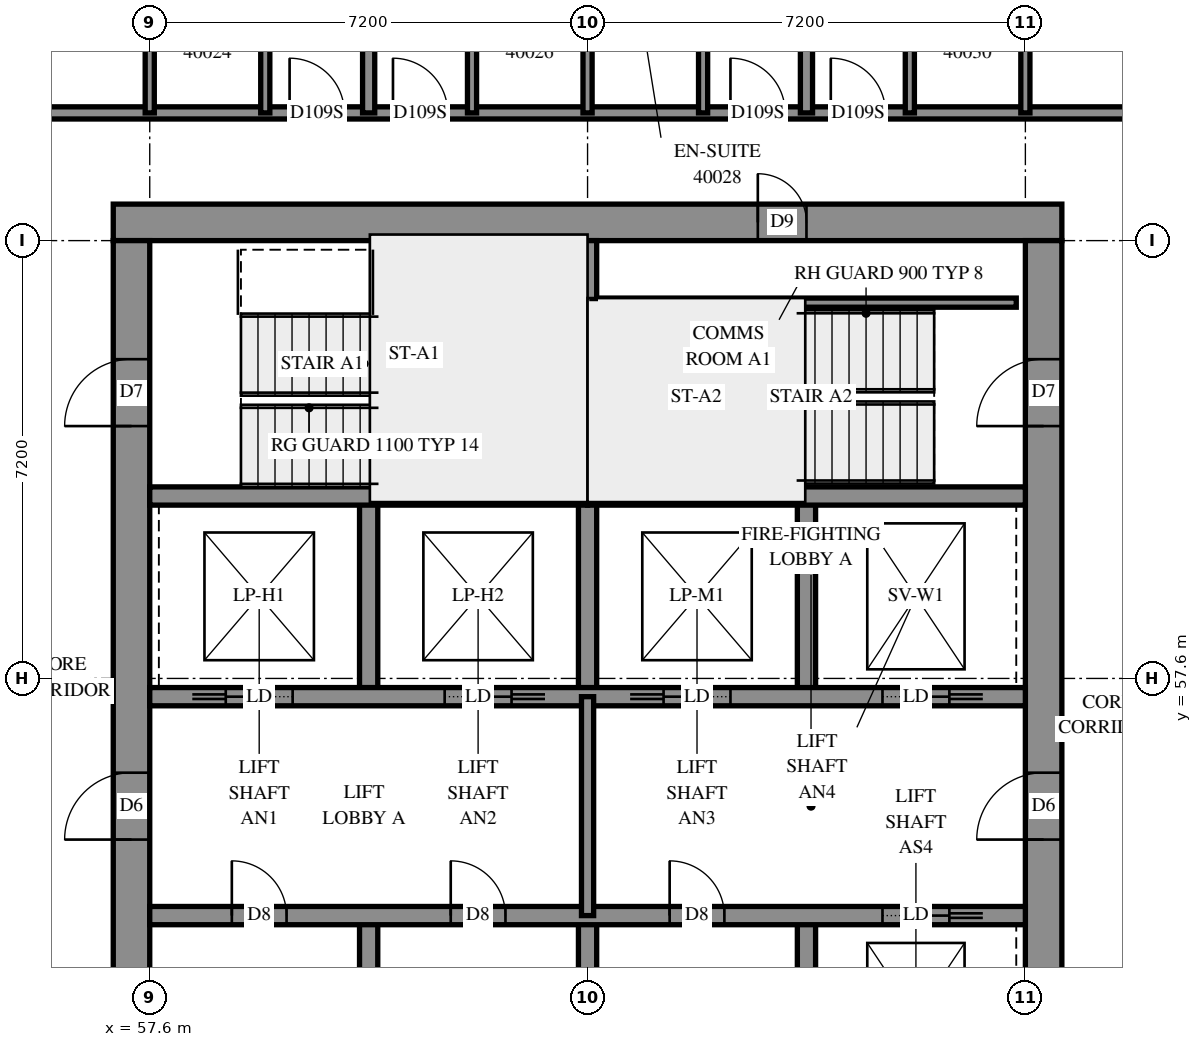
"""IFC4 building model, lengths in metres.
Left out: names, types, materials, properties, quantities, classifications, styles, units other than length and angle.
Written with IfcOpenShell. Run it as: python <this file> out.ifc"""

import sys

from ifc_helpers import new_model, si_unit, direction, frame, frame_2d, origin, place, context, subcontext, project, spatial, rectangle, extrude, element, fill, save


model = new_model("IFC4")
c1 = context("Model", 3, precision=1e-05, world=origin(), true_north=direction((0.0, 1.0)))
c2 = subcontext(c1, "Body", "Model", "MODEL_VIEW")
j1 = project(units=[si_unit("LENGTHUNIT", "METRE"), si_unit("PLANEANGLEUNIT", "RADIAN")], contexts=[c1])
p1 = place(None, origin())
s1 = spatial("IfcSite", under=j1, at=p1, CompositionType="ELEMENT")
p2 = place(p1, origin())
s2 = spatial("IfcBuilding", under=s1, at=p2, CompositionType="ELEMENT")
p3 = place(p2, frame((0.0, 0.0, 149.0)))
s3 = spatial("IfcBuildingStorey", under=s2, at=p3, CompositionType="ELEMENT", Elevation=149.0)
p4 = place(p3, frame((57.0, 65.1, -0.3), z_axis=(0.0, 0.0, 1.0), x_axis=(1.0, 0.0, 0.0)))
e1 = element("IfcWall", 1, at=p4, inside=s3, PredefinedType="SHEAR", context=c2, shape_type="SweptSolid", body=[
    extrude(rectangle(XDim=15.6, YDim=0.6, at=frame_2d((7.8, 0.0))), origin(), (0.0, 0.0, 1.0), 2.7),
])
p5 = place(p4, frame((10.6, 0.0, 0.3)))
e2 = element("IfcOpeningElement", 2, at=p5, cuts=e1, PredefinedType="OPENING", context=c2, shape_type="SweptSolid", body=[
    extrude(rectangle(XDim=0.8, YDim=2.1, at=frame_2d((0.4, 1.05))), frame((0.0, 0.31, 0.0), z_axis=(0.0, -1.0, 0.0), x_axis=(1.0, 0.0, 0.0)), (0.0, 0.0, 1.0), 0.62),
])
p6 = place(p3, frame((57.3, 50.4, -0.3), z_axis=(0.0, 0.0, 1.0), x_axis=(0.0, 1.0, 0.0)))
e3 = element("IfcWall", 3, at=p6, inside=s3, PredefinedType="SHEAR", context=c2, shape_type="SweptSolid", body=[
    extrude(rectangle(XDim=14.4, YDim=0.6, at=frame_2d((7.2, 0.0))), origin(), (0.0, 0.0, 1.0), 2.7),
])
p7 = place(p6, frame((4.55, 0.0, 0.3)))
e4 = element("IfcOpeningElement", 4, at=p7, cuts=e3, PredefinedType="OPENING", context=c2, shape_type="SweptSolid", body=[
    extrude(rectangle(XDim=1.1, YDim=2.1, at=frame_2d((0.55, 1.05))), frame((0.0, 0.31, 0.0), z_axis=(0.0, -1.0, 0.0), x_axis=(1.0, 0.0, 0.0)), (0.0, 0.0, 1.0), 0.62),
])
p8 = place(p6, frame((11.35, 0.0, 0.3)))
e5 = element("IfcOpeningElement", 5, at=p8, cuts=e3, PredefinedType="OPENING", context=c2, shape_type="SweptSolid", body=[
    extrude(rectangle(XDim=1.1, YDim=2.1, at=frame_2d((0.55, 1.05))), frame((0.0, 0.31, 0.0), z_axis=(0.0, -1.0, 0.0), x_axis=(1.0, 0.0, 0.0)), (0.0, 0.0, 1.0), 0.62),
])
p9 = place(p3, frame((72.3, 50.4, -0.3), z_axis=(0.0, 0.0, 1.0), x_axis=(0.0, 1.0, 0.0)))
e6 = element("IfcWall", 6, at=p9, inside=s3, PredefinedType="SHEAR", context=c2, shape_type="SweptSolid", body=[
    extrude(rectangle(XDim=14.4, YDim=0.6, at=frame_2d((7.2, 0.0))), origin(), (0.0, 0.0, 1.0), 2.7),
])
p10 = place(p9, frame((4.55, 0.0, 0.3)))
e7 = element("IfcOpeningElement", 7, at=p10, cuts=e6, PredefinedType="OPENING", context=c2, shape_type="SweptSolid", body=[
    extrude(rectangle(XDim=1.1, YDim=2.1, at=frame_2d((0.55, 1.05))), frame((0.0, 0.31, 0.0), z_axis=(0.0, -1.0, 0.0), x_axis=(1.0, 0.0, 0.0)), (0.0, 0.0, 1.0), 0.62),
])
p11 = place(p9, frame((11.35, 0.0, 0.3)))
e8 = element("IfcOpeningElement", 8, at=p11, cuts=e6, PredefinedType="OPENING", context=c2, shape_type="SweptSolid", body=[
    extrude(rectangle(XDim=1.1, YDim=2.1, at=frame_2d((0.55, 1.05))), frame((0.0, 0.31, 0.0), z_axis=(0.0, -1.0, 0.0), x_axis=(1.0, 0.0, 0.0)), (0.0, 0.0, 1.0), 0.62),
])
for number, where, z_axis, x_axis in (
    (9, (61.2, 50.4, 0.0), (0.0, 0.0, 1.0), (0.0, 1.0, 0.0)),
    (10, (61.2, 57.3, 0.0), (0.0, 0.0, 1.0), (0.0, 1.0, 0.0)),
    (11, (64.8, 50.4, 0.0), (0.0, 0.0, 1.0), (0.0, 1.0, 0.0)),
    (12, (64.8, 57.3, 0.0), (0.0, 0.0, 1.0), (0.0, 1.0, 0.0)),
    (13, (68.4, 50.4, 0.0), (0.0, 0.0, 1.0), (0.0, 1.0, 0.0)),
    (14, (68.4, 57.3, 0.0), (0.0, 0.0, 1.0), (0.0, 1.0, 0.0)),
):
    element("IfcWall", number, at=place(p3, frame(where, z_axis=z_axis, x_axis=x_axis)), inside=s3, PredefinedType="SOLIDWALL", context=c2, shape_type="SweptSolid", body=[
        extrude(rectangle(XDim=3.3, YDim=0.3, at=frame_2d((1.65, 0.0))), origin(), (0.0, 0.0, 1.0), 3.1),
    ])
p12 = place(p3, frame((57.6, 53.7, 0.0), z_axis=(0.0, 0.0, 1.0), x_axis=(1.0, 0.0, 0.0)))
e15 = element("IfcWall", 15, at=p12, inside=s3, PredefinedType="SOLIDWALL", context=c2, shape_type="SweptSolid", body=[
    extrude(rectangle(XDim=14.4, YDim=0.3, at=frame_2d((7.2, 0.0))), origin(), (0.0, 0.0, 1.0), 3.1),
])
p13 = place(p12, frame((1.35, 0.0, 0.0)))
e16 = element("IfcOpeningElement", 16, at=p13, cuts=e15, PredefinedType="OPENING", context=c2, shape_type="SweptSolid", body=[
    extrude(rectangle(XDim=0.9, YDim=2.1, at=frame_2d((0.45, 1.05))), frame((0.0, 0.16, 0.0), z_axis=(0.0, -1.0, 0.0), x_axis=(1.0, 0.0, 0.0)), (0.0, 0.0, 1.0), 0.32),
])
p14 = place(p12, frame((4.95, 0.0, 0.0)))
e17 = element("IfcOpeningElement", 17, at=p14, cuts=e15, PredefinedType="OPENING", context=c2, shape_type="SweptSolid", body=[
    extrude(rectangle(XDim=0.9, YDim=2.1, at=frame_2d((0.45, 1.05))), frame((0.0, 0.16, 0.0), z_axis=(0.0, -1.0, 0.0), x_axis=(1.0, 0.0, 0.0)), (0.0, 0.0, 1.0), 0.32),
])
p15 = place(p12, frame((8.55, 0.0, 0.0)))
e18 = element("IfcOpeningElement", 18, at=p15, cuts=e15, PredefinedType="OPENING", context=c2, shape_type="SweptSolid", body=[
    extrude(rectangle(XDim=0.9, YDim=2.1, at=frame_2d((0.45, 1.05))), frame((0.0, 0.16, 0.0), z_axis=(0.0, -1.0, 0.0), x_axis=(1.0, 0.0, 0.0)), (0.0, 0.0, 1.0), 0.32),
])
p16 = place(p12, frame((12.05, 0.0, 0.0)))
e19 = element("IfcOpeningElement", 19, at=p16, cuts=e15, PredefinedType="OPENING", context=c2, shape_type="SweptSolid", body=[
    extrude(rectangle(XDim=1.1, YDim=2.1, at=frame_2d((0.55, 1.05))), frame((0.0, 0.16, 0.0), z_axis=(0.0, -1.0, 0.0), x_axis=(1.0, 0.0, 0.0)), (0.0, 0.0, 1.0), 0.32),
])
p17 = place(p3, frame((57.6, 57.3, 0.0), z_axis=(0.0, 0.0, 1.0), x_axis=(1.0, 0.0, 0.0)))
e20 = element("IfcWall", 20, at=p17, inside=s3, PredefinedType="SOLIDWALL", context=c2, shape_type="SweptSolid", body=[
    extrude(rectangle(XDim=14.4, YDim=0.3, at=frame_2d((7.2, 0.0))), origin(), (0.0, 0.0, 1.0), 3.1),
])
p18 = place(p17, frame((1.25, 0.0, 0.0)))
e21 = element("IfcOpeningElement", 21, at=p18, cuts=e20, PredefinedType="OPENING", context=c2, shape_type="SweptSolid", body=[
    extrude(rectangle(XDim=1.1, YDim=2.1, at=frame_2d((0.55, 1.05))), frame((0.0, 0.16, 0.0), z_axis=(0.0, -1.0, 0.0), x_axis=(1.0, 0.0, 0.0)), (0.0, 0.0, 1.0), 0.32),
])
p19 = place(p17, frame((4.85, 0.0, 0.0)))
e22 = element("IfcOpeningElement", 22, at=p19, cuts=e20, PredefinedType="OPENING", context=c2, shape_type="SweptSolid", body=[
    extrude(rectangle(XDim=1.1, YDim=2.1, at=frame_2d((0.55, 1.05))), frame((0.0, 0.16, 0.0), z_axis=(0.0, -1.0, 0.0), x_axis=(1.0, 0.0, 0.0)), (0.0, 0.0, 1.0), 0.32),
])
p20 = place(p17, frame((8.45, 0.0, 0.0)))
e23 = element("IfcOpeningElement", 23, at=p20, cuts=e20, PredefinedType="OPENING", context=c2, shape_type="SweptSolid", body=[
    extrude(rectangle(XDim=1.1, YDim=2.1, at=frame_2d((0.55, 1.05))), frame((0.0, 0.16, 0.0), z_axis=(0.0, -1.0, 0.0), x_axis=(1.0, 0.0, 0.0)), (0.0, 0.0, 1.0), 0.32),
])
p21 = place(p17, frame((12.05, 0.0, 0.0)))
e24 = element("IfcOpeningElement", 24, at=p21, cuts=e20, PredefinedType="OPENING", context=c2, shape_type="SweptSolid", body=[
    extrude(rectangle(XDim=1.1, YDim=2.1, at=frame_2d((0.55, 1.05))), frame((0.0, 0.16, 0.0), z_axis=(0.0, -1.0, 0.0), x_axis=(1.0, 0.0, 0.0)), (0.0, 0.0, 1.0), 0.32),
])
for number, where, z_axis, x_axis in (
    (25, (57.6, 60.6, 0.0), (0.0, 0.0, 1.0), (1.0, 0.0, 0.0)),
    (26, (64.8, 60.6, 0.0), (0.0, 0.0, 1.0), (1.0, 0.0, 0.0)),
):
    element("IfcWall", number, at=place(p3, frame(where, z_axis=z_axis, x_axis=x_axis)), inside=s3, PredefinedType="SOLIDWALL", context=c2, shape_type="SweptSolid", body=[
        extrude(rectangle(XDim=7.2, YDim=0.3, at=frame_2d((3.6, 0.0))), origin(), (0.0, 0.0, 1.0), 3.1),
    ])
p22 = place(p3, frame((64.8, 60.6, 0.0), z_axis=(0.0, 0.0, 1.0), x_axis=(0.0, 1.0, 0.0)))
e27 = element("IfcWall", 27, at=p22, inside=s3, PredefinedType="SOLIDWALL", context=c2, shape_type="SweptSolid", body=[
    extrude(rectangle(XDim=4.2, YDim=0.3, at=frame_2d((2.1, 0.0))), origin(), (0.0, 0.0, 1.0), 3.1),
])
p23 = place(p3, frame((64.95, 63.78, 0.0), z_axis=(0.0, 0.0, 1.0), x_axis=(1.0, 0.0, 0.0)))
e28 = element("IfcWall", 28, at=p23, inside=s3, PredefinedType="PARTITIONING", context=c2, shape_type="SweptSolid", body=[
    extrude(rectangle(XDim=6.9, YDim=0.15, at=frame_2d((3.45, 0.0))), origin(), (0.0, 0.0, 1.0), 3.1),
])
p24 = place(p3, frame((64.8, 53.7, 0.0), z_axis=(0.0, 0.0, 1.0), x_axis=(0.0, 1.0, 0.0)))
e29 = element("IfcWall", 29, at=p24, inside=s3, PredefinedType="PARTITIONING", context=c2, shape_type="SweptSolid", body=[
    extrude(rectangle(XDim=3.6, YDim=0.2, at=frame_2d((1.8, 0.0))), origin(), (0.0, 0.0, 1.0), 3.1),
])
p25 = place(p3, frame((55.5, 66.9, 0.0), z_axis=(0.0, 0.0, 1.0), x_axis=(1.0, 0.0, 0.0)))
e30 = element("IfcWall", 30, at=p25, inside=s3, PredefinedType="PARTITIONING", context=c2, shape_type="SweptSolid", body=[
    extrude(rectangle(XDim=18.6, YDim=0.2, at=frame_2d((9.3, 0.0))), origin(), (0.0, 0.0, 1.0), 3.1),
])
p26 = place(p25, frame((4.4, 0.0, 0.0)))
e31 = element("IfcOpeningElement", 31, at=p26, cuts=e30, PredefinedType="OPENING", context=c2, shape_type="SweptSolid", body=[
    extrude(rectangle(XDim=0.9, YDim=2.1, at=frame_2d((0.45, 1.05))), frame((0.0, 0.11, 0.0), z_axis=(0.0, -1.0, 0.0), x_axis=(1.0, 0.0, 0.0)), (0.0, 0.0, 1.0), 0.22),
])
p27 = place(p25, frame((6.1, 0.0, 0.0)))
e32 = element("IfcOpeningElement", 32, at=p27, cuts=e30, PredefinedType="OPENING", context=c2, shape_type="SweptSolid", body=[
    extrude(rectangle(XDim=0.9, YDim=2.1, at=frame_2d((0.45, 1.05))), frame((0.0, 0.11, 0.0), z_axis=(0.0, -1.0, 0.0), x_axis=(1.0, 0.0, 0.0)), (0.0, 0.0, 1.0), 0.22),
])
p28 = place(p25, frame((11.65, 0.0, 0.0)))
e33 = element("IfcOpeningElement", 33, at=p28, cuts=e30, PredefinedType="OPENING", context=c2, shape_type="SweptSolid", body=[
    extrude(rectangle(XDim=0.9, YDim=2.1, at=frame_2d((0.45, 1.05))), frame((0.0, 0.11, 0.0), z_axis=(0.0, -1.0, 0.0), x_axis=(1.0, 0.0, 0.0)), (0.0, 0.0, 1.0), 0.22),
])
p29 = place(p25, frame((13.3, 0.0, 0.0)))
e34 = element("IfcOpeningElement", 34, at=p29, cuts=e30, PredefinedType="OPENING", context=c2, shape_type="SweptSolid", body=[
    extrude(rectangle(XDim=0.9, YDim=2.1, at=frame_2d((0.45, 1.05))), frame((0.0, 0.11, 0.0), z_axis=(0.0, -1.0, 0.0), x_axis=(1.0, 0.0, 0.0)), (0.0, 0.0, 1.0), 0.22),
])
p30 = place(p3, frame((68.4, 66.9, 0.0), z_axis=(0.0, 0.0, 1.0), x_axis=(0.0, 1.0, 0.0)))
e35 = element("IfcWall", 35, at=p30, inside=s3, PredefinedType="PARTITIONING", context=c2, shape_type="SweptSolid", body=[
    extrude(rectangle(XDim=5.834, YDim=0.2, at=frame_2d((2.917, 0.0))), origin(), (0.0, 0.0, 1.0), 3.1),
])
p31 = place(p3, frame((61.2, 66.9, 0.0), z_axis=(0.0, 0.0, 1.0), x_axis=(0.0, 1.0, 0.0)))
e36 = element("IfcWall", 36, at=p31, inside=s3, PredefinedType="PARTITIONING", context=c2, shape_type="SweptSolid", body=[
    extrude(rectangle(XDim=5.804, YDim=0.2, at=frame_2d((2.902, 0.0))), origin(), (0.0, 0.0, 1.0), 3.1),
])
for number, where, z_axis, x_axis in (
    (37, (59.5, 66.9, 0.0), (0.0, 0.0, 1.0), (0.0, 1.0, 0.0)),
    (38, (57.6, 66.9, 0.0), (0.0, 0.0, 1.0), (0.0, 1.0, 0.0)),
    (39, (62.9, 66.9, 0.0), (0.0, 0.0, 1.0), (0.0, 1.0, 0.0)),
    (40, (64.8, 66.9, 0.0), (0.0, 0.0, 1.0), (0.0, 1.0, 0.0)),
    (41, (66.7, 66.9, 0.0), (0.0, 0.0, 1.0), (0.0, 1.0, 0.0)),
    (42, (70.1, 66.9, 0.0), (0.0, 0.0, 1.0), (0.0, 1.0, 0.0)),
    (43, (72.0, 66.9, 0.0), (0.0, 0.0, 1.0), (0.0, 1.0, 0.0)),
):
    element("IfcWall", number, at=place(p3, frame(where, z_axis=z_axis, x_axis=x_axis)), inside=s3, PredefinedType="PARTITIONING", context=c2, shape_type="SweptSolid", body=[
        extrude(rectangle(XDim=2.4, YDim=0.15, at=frame_2d((1.2, 0.0))), origin(), (0.0, 0.0, 1.0), 3.1),
    ])
p32 = place(p5, origin())
e44 = element("IfcDoor", 44, at=p32, inside=s3, OperationType="SINGLE_SWING_RIGHT", PredefinedType="DOOR", context=c2, shape_type="SweptSolid", body=[
    extrude(rectangle(XDim=0.8, YDim=2.1, at=frame_2d((0.4, 1.05))), frame((0.0, 0.025, 0.0), z_axis=(0.0, -1.0, 0.0), x_axis=(1.0, 0.0, 0.0)), (0.0, 0.0, 1.0), 0.05),
])
fill(e2, e44)
p33 = place(p7, origin())
e45 = element("IfcDoor", 45, at=p33, inside=s3, OperationType="DOUBLE_DOOR_SINGLE_SWING", PredefinedType="DOOR", context=c2, shape_type="SweptSolid", body=[
    extrude(rectangle(XDim=1.1, YDim=2.1, at=frame_2d((0.55, 1.05))), frame((0.0, 0.025, 0.0), z_axis=(0.0, -1.0, 0.0), x_axis=(1.0, 0.0, 0.0)), (0.0, 0.0, 1.0), 0.05),
])
fill(e4, e45)
p34 = place(p10, origin())
e46 = element("IfcDoor", 46, at=p34, inside=s3, OperationType="DOUBLE_DOOR_SINGLE_SWING", PredefinedType="DOOR", context=c2, shape_type="SweptSolid", body=[
    extrude(rectangle(XDim=1.1, YDim=2.1, at=frame_2d((0.55, 1.05))), frame((0.0, 0.025, 0.0), z_axis=(0.0, -1.0, 0.0), x_axis=(1.0, 0.0, 0.0)), (0.0, 0.0, 1.0), 0.05),
])
fill(e7, e46)
p35 = place(p8, origin())
e47 = element("IfcDoor", 47, at=p35, inside=s3, OperationType="SINGLE_SWING_LEFT", PredefinedType="DOOR", context=c2, shape_type="SweptSolid", body=[
    extrude(rectangle(XDim=1.1, YDim=2.1, at=frame_2d((0.55, 1.05))), frame((0.0, 0.025, 0.0), z_axis=(0.0, -1.0, 0.0), x_axis=(1.0, 0.0, 0.0)), (0.0, 0.0, 1.0), 0.05),
])
fill(e5, e47)
p36 = place(p11, origin())
e48 = element("IfcDoor", 48, at=p36, inside=s3, OperationType="SINGLE_SWING_RIGHT", PredefinedType="DOOR", context=c2, shape_type="SweptSolid", body=[
    extrude(rectangle(XDim=1.1, YDim=2.1, at=frame_2d((0.55, 1.05))), frame((0.0, 0.025, 0.0), z_axis=(0.0, -1.0, 0.0), x_axis=(1.0, 0.0, 0.0)), (0.0, 0.0, 1.0), 0.05),
])
fill(e8, e48)
p37 = place(p13, origin())
e49 = element("IfcDoor", 49, at=p37, inside=s3, OperationType="SINGLE_SWING_LEFT", PredefinedType="DOOR", context=c2, shape_type="SweptSolid", body=[
    extrude(rectangle(XDim=0.9, YDim=2.1, at=frame_2d((0.45, 1.05))), frame((0.0, 0.025, 0.0), z_axis=(0.0, -1.0, 0.0), x_axis=(1.0, 0.0, 0.0)), (0.0, 0.0, 1.0), 0.05),
])
fill(e16, e49)
p38 = place(p14, origin())
e50 = element("IfcDoor", 50, at=p38, inside=s3, OperationType="SINGLE_SWING_LEFT", PredefinedType="DOOR", context=c2, shape_type="SweptSolid", body=[
    extrude(rectangle(XDim=0.9, YDim=2.1, at=frame_2d((0.45, 1.05))), frame((0.0, 0.025, 0.0), z_axis=(0.0, -1.0, 0.0), x_axis=(1.0, 0.0, 0.0)), (0.0, 0.0, 1.0), 0.05),
])
fill(e17, e50)
p39 = place(p15, origin())
e51 = element("IfcDoor", 51, at=p39, inside=s3, OperationType="SINGLE_SWING_LEFT", PredefinedType="DOOR", context=c2, shape_type="SweptSolid", body=[
    extrude(rectangle(XDim=0.9, YDim=2.1, at=frame_2d((0.45, 1.05))), frame((0.0, 0.025, 0.0), z_axis=(0.0, -1.0, 0.0), x_axis=(1.0, 0.0, 0.0)), (0.0, 0.0, 1.0), 0.05),
])
fill(e18, e51)
p40 = place(p16, origin())
e52 = element("IfcDoor", 52, at=p40, inside=s3, OperationType="SLIDING_TO_RIGHT", PredefinedType="DOOR", context=c2, shape_type="SweptSolid", body=[
    extrude(rectangle(XDim=1.1, YDim=2.1, at=frame_2d((0.55, 1.05))), frame((0.0, 0.025, 0.0), z_axis=(0.0, -1.0, 0.0), x_axis=(1.0, 0.0, 0.0)), (0.0, 0.0, 1.0), 0.05),
])
fill(e19, e52)
p41 = place(p18, origin())
e53 = element("IfcDoor", 53, at=p41, inside=s3, OperationType="SLIDING_TO_LEFT", PredefinedType="DOOR", context=c2, shape_type="SweptSolid", body=[
    extrude(rectangle(XDim=1.1, YDim=2.1, at=frame_2d((0.55, 1.05))), frame((0.0, 0.025, 0.0), z_axis=(0.0, -1.0, 0.0), x_axis=(1.0, 0.0, 0.0)), (0.0, 0.0, 1.0), 0.05),
])
fill(e21, e53)
p42 = place(p19, origin())
e54 = element("IfcDoor", 54, at=p42, inside=s3, OperationType="SLIDING_TO_RIGHT", PredefinedType="DOOR", context=c2, shape_type="SweptSolid", body=[
    extrude(rectangle(XDim=1.1, YDim=2.1, at=frame_2d((0.55, 1.05))), frame((0.0, 0.025, 0.0), z_axis=(0.0, -1.0, 0.0), x_axis=(1.0, 0.0, 0.0)), (0.0, 0.0, 1.0), 0.05),
])
fill(e22, e54)
p43 = place(p20, origin())
e55 = element("IfcDoor", 55, at=p43, inside=s3, OperationType="SLIDING_TO_LEFT", PredefinedType="DOOR", context=c2, shape_type="SweptSolid", body=[
    extrude(rectangle(XDim=1.1, YDim=2.1, at=frame_2d((0.55, 1.05))), frame((0.0, 0.025, 0.0), z_axis=(0.0, -1.0, 0.0), x_axis=(1.0, 0.0, 0.0)), (0.0, 0.0, 1.0), 0.05),
])
fill(e23, e55)
p44 = place(p21, origin())
e56 = element("IfcDoor", 56, at=p44, inside=s3, OperationType="SLIDING_TO_RIGHT", PredefinedType="DOOR", context=c2, shape_type="SweptSolid", body=[
    extrude(rectangle(XDim=1.1, YDim=2.1, at=frame_2d((0.55, 1.05))), frame((0.0, 0.025, 0.0), z_axis=(0.0, -1.0, 0.0), x_axis=(1.0, 0.0, 0.0)), (0.0, 0.0, 1.0), 0.05),
])
fill(e24, e56)
p45 = place(p26, origin())
e57 = element("IfcDoor", 57, at=p45, inside=s3, OperationType="SINGLE_SWING_RIGHT", PredefinedType="DOOR", context=c2, shape_type="SweptSolid", body=[
    extrude(rectangle(XDim=0.9, YDim=2.1, at=frame_2d((0.45, 1.05))), frame((0.0, 0.025, 0.0), z_axis=(0.0, -1.0, 0.0), x_axis=(1.0, 0.0, 0.0)), (0.0, 0.0, 1.0), 0.05),
])
fill(e31, e57)
p46 = place(p27, origin())
e58 = element("IfcDoor", 58, at=p46, inside=s3, OperationType="SINGLE_SWING_LEFT", PredefinedType="DOOR", context=c2, shape_type="SweptSolid", body=[
    extrude(rectangle(XDim=0.9, YDim=2.1, at=frame_2d((0.45, 1.05))), frame((0.0, 0.025, 0.0), z_axis=(0.0, -1.0, 0.0), x_axis=(1.0, 0.0, 0.0)), (0.0, 0.0, 1.0), 0.05),
])
fill(e32, e58)
p47 = place(p28, origin())
e59 = element("IfcDoor", 59, at=p47, inside=s3, OperationType="SINGLE_SWING_RIGHT", PredefinedType="DOOR", context=c2, shape_type="SweptSolid", body=[
    extrude(rectangle(XDim=0.9, YDim=2.1, at=frame_2d((0.45, 1.05))), frame((0.0, 0.025, 0.0), z_axis=(0.0, -1.0, 0.0), x_axis=(1.0, 0.0, 0.0)), (0.0, 0.0, 1.0), 0.05),
])
fill(e33, e59)
p48 = place(p29, origin())
e60 = element("IfcDoor", 60, at=p48, inside=s3, OperationType="SINGLE_SWING_LEFT", PredefinedType="DOOR", context=c2, shape_type="SweptSolid", body=[
    extrude(rectangle(XDim=0.9, YDim=2.1, at=frame_2d((0.45, 1.05))), frame((0.0, 0.025, 0.0), z_axis=(0.0, -1.0, 0.0), x_axis=(1.0, 0.0, 0.0)), (0.0, 0.0, 1.0), 0.05),
])
fill(e34, e60)
save(model, sys.argv[1])
